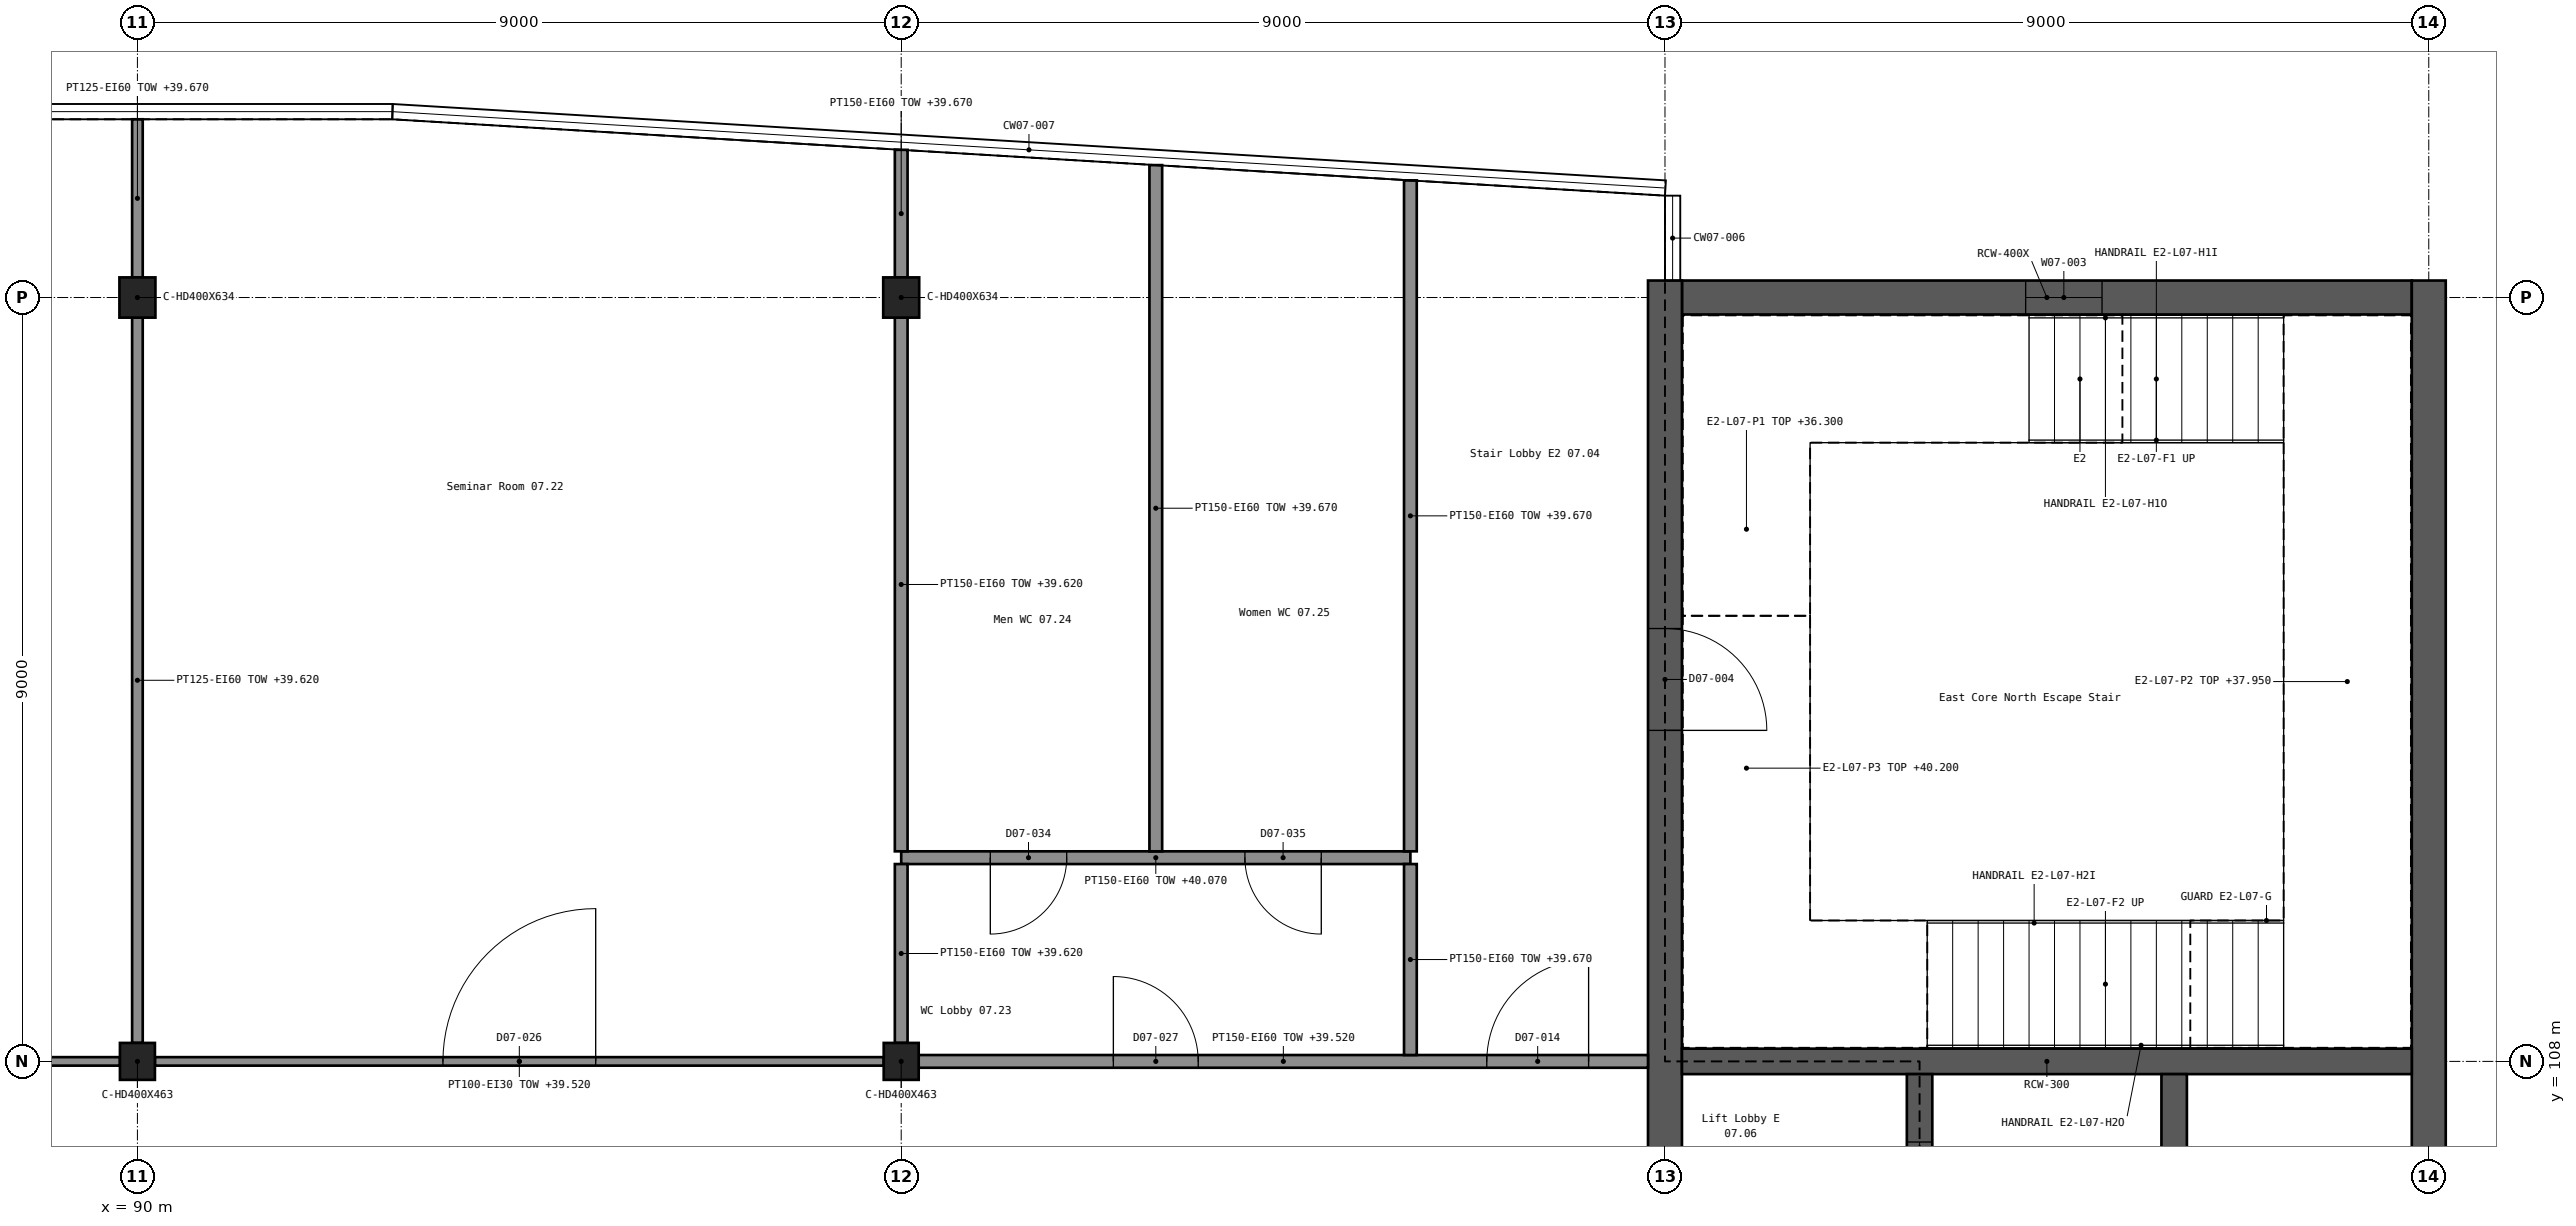
"""IFC4 building model, lengths in metres.
Left out: names, types, materials, properties, quantities, classifications, styles, units other than length and angle.
Written with IfcOpenShell. Run it as: python <this file> out.ifc"""

import sys

from ifc_helpers import new_model, si_unit, direction, frame, frame_2d, origin, origin_2d, place, context, subcontext, project, spatial, rectangle, i_section, extrude, element, fill, save


model = new_model("IFC4")
c1 = context("Model", 3, precision=1e-05, world=origin(), true_north=direction((0.0, 1.0)))
c2 = subcontext(c1, "Body", "Model", "MODEL_VIEW")
j1 = project(units=[si_unit("LENGTHUNIT", "METRE"), si_unit("PLANEANGLEUNIT", "RADIAN")], contexts=[c1])
p1 = place(None, origin())
s1 = spatial("IfcSite", under=j1, at=p1, CompositionType="ELEMENT")
p2 = place(p1, origin())
s2 = spatial("IfcBuilding", under=s1, at=p2, CompositionType="ELEMENT")
p3 = place(p2, frame((0.0, 0.0, 36.3)))
s3 = spatial("IfcBuildingStorey", under=s2, at=p3, CompositionType="ELEMENT", Elevation=36.3)
p4 = place(p3, frame((108.2, 117.0, 0.0), z_axis=(0.0, 0.0, 1.0), x_axis=(1.0, 0.0, 0.0)))
e1 = element("IfcWall", 1, at=p4, inside=s3, PredefinedType="SHEAR", context=c2, shape_type="SweptSolid", body=[
    extrude(rectangle(XDim=8.6, YDim=0.4, at=frame_2d((4.3, 0.0))), origin(), (0.0, 0.0, 1.0), 3.9),
])
p5 = place(p4, frame((4.05, 0.0, 1.2)))
e2 = element("IfcOpeningElement", 2, at=p5, cuts=e1, PredefinedType="OPENING", context=c2, shape_type="SweptSolid", body=[
    extrude(rectangle(XDim=0.9, YDim=1.5, at=frame_2d((0.45, 0.75))), frame((0.0, 0.211, 0.0), z_axis=(0.0, -1.0, 0.0), x_axis=(1.0, 0.0, 0.0)), (0.0, 0.0, 1.0), 0.422),
])
p6 = place(p3, frame((108.0, 89.8, 0.0), z_axis=(0.0, 0.0, 1.0), x_axis=(0.0, 1.0, 0.0)))
e3 = element("IfcWall", 3, at=p6, inside=s3, PredefinedType="SHEAR", context=c2, shape_type="SweptSolid", body=[
    extrude(rectangle(XDim=27.4, YDim=0.4, at=frame_2d((13.7, 0.0))), origin(), (0.0, 0.0, 1.0), 3.9),
])
p7 = place(p6, frame((4.1, 0.0, 0.0)))
e4 = element("IfcOpeningElement", 4, at=p7, cuts=e3, PredefinedType="OPENING", context=c2, shape_type="SweptSolid", body=[
    extrude(rectangle(XDim=1.2, YDim=2.1, at=frame_2d((0.6, 1.05))), frame((0.0, 0.211, 0.0), z_axis=(0.0, -1.0, 0.0), x_axis=(1.0, 0.0, 0.0)), (0.0, 0.0, 1.0), 0.422),
])
p8 = place(p6, frame((22.1, 0.0, 0.0)))
e5 = element("IfcOpeningElement", 5, at=p8, cuts=e3, PredefinedType="OPENING", context=c2, shape_type="SweptSolid", body=[
    extrude(rectangle(XDim=1.2, YDim=2.1, at=frame_2d((0.6, 1.05))), frame((0.0, 0.211, 0.0), z_axis=(0.0, -1.0, 0.0), x_axis=(1.0, 0.0, 0.0)), (0.0, 0.0, 1.0), 0.422),
])
p9 = place(p6, frame((12.5, 0.0, 0.0)))
e6 = element("IfcOpeningElement", 6, at=p9, cuts=e3, PredefinedType="OPENING", context=c2, shape_type="SweptSolid", body=[
    extrude(rectangle(XDim=2.0, YDim=2.1, at=frame_2d((1.0, 1.05))), frame((0.0, 0.211, 0.0), z_axis=(0.0, -1.0, 0.0), x_axis=(1.0, 0.0, 0.0)), (0.0, 0.0, 1.0), 0.422),
])
p10 = place(p3, frame((117.0, 89.8, 0.0), z_axis=(0.0, 0.0, 1.0), x_axis=(0.0, 1.0, 0.0)))
e7 = element("IfcWall", 7, at=p10, inside=s3, PredefinedType="SHEAR", context=c2, shape_type="SweptSolid", body=[
    extrude(rectangle(XDim=27.4, YDim=0.4, at=frame_2d((13.7, 0.0))), origin(), (0.0, 0.0, 1.0), 3.9),
])
p11 = place(p3, frame((108.2, 108.0, 0.0), z_axis=(0.0, 0.0, 1.0), x_axis=(1.0, 0.0, 0.0)))
e8 = element("IfcWall", 8, at=p11, inside=s3, PredefinedType="SHEAR", context=c2, shape_type="SweptSolid", body=[
    extrude(rectangle(XDim=8.6, YDim=0.3, at=frame_2d((4.3, 0.0))), origin(), (0.0, 0.0, 1.0), 3.9),
])
p12 = place(p3, frame((111.0, 99.15, 0.0), z_axis=(0.0, 0.0, 1.0), x_axis=(0.0, 1.0, 0.0)))
e9 = element("IfcWall", 9, at=p12, inside=s3, PredefinedType="SHEAR", context=c2, shape_type="SweptSolid", body=[
    extrude(rectangle(XDim=8.7, YDim=0.3, at=frame_2d((4.35, 0.0))), origin(), (0.0, 0.0, 1.0), 3.9),
])
p13 = place(p12, frame((0.8, 0.0, 0.0)))
e10 = element("IfcOpeningElement", 10, at=p13, cuts=e9, PredefinedType="OPENING", context=c2, shape_type="SweptSolid", body=[
    extrude(rectangle(XDim=1.1, YDim=2.1, at=frame_2d((0.55, 1.05))), frame((0.0, 0.161, 0.0), z_axis=(0.0, -1.0, 0.0), x_axis=(1.0, 0.0, 0.0)), (0.0, 0.0, 1.0), 0.322),
])
p14 = place(p12, frame((3.8, 0.0, 0.0)))
e11 = element("IfcOpeningElement", 11, at=p14, cuts=e9, PredefinedType="OPENING", context=c2, shape_type="SweptSolid", body=[
    extrude(rectangle(XDim=1.1, YDim=2.1, at=frame_2d((0.55, 1.05))), frame((0.0, 0.161, 0.0), z_axis=(0.0, -1.0, 0.0), x_axis=(1.0, 0.0, 0.0)), (0.0, 0.0, 1.0), 0.322),
])
p15 = place(p12, frame((6.8, 0.0, 0.0)))
e12 = element("IfcOpeningElement", 12, at=p15, cuts=e9, PredefinedType="OPENING", context=c2, shape_type="SweptSolid", body=[
    extrude(rectangle(XDim=1.1, YDim=2.1, at=frame_2d((0.55, 1.05))), frame((0.0, 0.161, 0.0), z_axis=(0.0, -1.0, 0.0), x_axis=(1.0, 0.0, 0.0)), (0.0, 0.0, 1.0), 0.322),
])
p16 = place(p3, frame((114.0, 99.15, 0.0), z_axis=(0.0, 0.0, 1.0), x_axis=(0.0, 1.0, 0.0)))
e13 = element("IfcWall", 13, at=p16, inside=s3, PredefinedType="SHEAR", context=c2, shape_type="SweptSolid", body=[
    extrude(rectangle(XDim=8.7, YDim=0.3, at=frame_2d((4.35, 0.0))), origin(), (0.0, 0.0, 1.0), 3.9),
])
for number, where, z_axis, x_axis in (
    (14, (90.0, 108.0, 0.0), (0.0, 0.0, 1.0), (1.0, 0.0, 0.0)),
    (15, (99.0, 108.0, 0.0), (0.0, 0.0, 1.0), (1.0, 0.0, 0.0)),
):
    element("IfcColumn", number, at=place(p3, frame(where, z_axis=z_axis, x_axis=x_axis)), inside=s3, PredefinedType="COLUMN", context=c2, shape_type="SweptSolid", body=[
        extrude(i_section(OverallWidth=0.412, OverallDepth=0.435, WebThickness=0.036, FlangeThickness=0.057, FilletRadius=0.015, at=origin_2d()), origin(), (0.0, 0.0, 1.0), 3.9),
    ])
for number, where, z_axis, x_axis in (
    (16, (90.0, 117.0, 0.0), (0.0, 0.0, 1.0), (1.0, 0.0, 0.0)),
    (17, (99.0, 117.0, 0.0), (0.0, 0.0, 1.0), (1.0, 0.0, 0.0)),
):
    element("IfcColumn", number, at=place(p3, frame(where, z_axis=z_axis, x_axis=x_axis)), inside=s3, PredefinedType="COLUMN", context=c2, shape_type="SweptSolid", body=[
        extrude(i_section(OverallWidth=0.424, OverallDepth=0.474, WebThickness=0.048, FlangeThickness=0.077, FilletRadius=0.015, at=origin_2d()), origin(), (0.0, 0.0, 1.0), 3.9),
    ])
p17 = place(p3, frame((81.206, 108.0, 0.0), z_axis=(0.0, 0.0, 1.0), x_axis=(1.0, 0.0, 0.0)))
e18 = element("IfcWall", 18, at=p17, inside=s3, PredefinedType="PARTITIONING", context=c2, shape_type="SweptSolid", body=[
    extrude(rectangle(XDim=8.588, YDim=0.1, at=frame_2d((4.294, 0.0))), origin(), (0.0, 0.0, 1.0), 3.22),
])
p18 = place(p17, frame((0.544, 0.0, 0.0)))
e19 = element("IfcOpeningElement", 19, at=p18, cuts=e18, PredefinedType="OPENING", context=c2, shape_type="SweptSolid", body=[
    extrude(rectangle(XDim=1.0, YDim=2.1, at=frame_2d((0.5, 1.05))), frame((0.0, 0.061, 0.0), z_axis=(0.0, -1.0, 0.0), x_axis=(1.0, 0.0, 0.0)), (0.0, 0.0, 1.0), 0.122),
])
p19 = place(p17, frame((6.169, 0.0, 0.0)))
e20 = element("IfcOpeningElement", 20, at=p19, cuts=e18, PredefinedType="OPENING", context=c2, shape_type="SweptSolid", body=[
    extrude(rectangle(XDim=1.0, YDim=2.1, at=frame_2d((0.5, 1.05))), frame((0.0, 0.061, 0.0), z_axis=(0.0, -1.0, 0.0), x_axis=(1.0, 0.0, 0.0)), (0.0, 0.0, 1.0), 0.122),
])
p20 = place(p3, frame((90.206, 108.0, 0.0), z_axis=(0.0, 0.0, 1.0), x_axis=(1.0, 0.0, 0.0)))
e21 = element("IfcWall", 21, at=p20, inside=s3, PredefinedType="PARTITIONING", context=c2, shape_type="SweptSolid", body=[
    extrude(rectangle(XDim=8.588, YDim=0.1, at=frame_2d((4.294, 0.0))), origin(), (0.0, 0.0, 1.0), 3.22),
])
p21 = place(p20, frame((3.394, 0.0, 0.0)))
e22 = element("IfcOpeningElement", 22, at=p21, cuts=e21, PredefinedType="OPENING", context=c2, shape_type="SweptSolid", body=[
    extrude(rectangle(XDim=1.8, YDim=2.1, at=frame_2d((0.9, 1.05))), frame((0.0, 0.061, 0.0), z_axis=(0.0, -1.0, 0.0), x_axis=(1.0, 0.0, 0.0)), (0.0, 0.0, 1.0), 0.122),
])
p22 = place(p3, frame((99.206, 108.0, 0.0), z_axis=(0.0, 0.0, 1.0), x_axis=(1.0, 0.0, 0.0)))
e23 = element("IfcWall", 23, at=p22, inside=s3, PredefinedType="PARTITIONING", context=c2, shape_type="SweptSolid", body=[
    extrude(rectangle(XDim=8.594, YDim=0.15, at=frame_2d((4.297, 0.0))), origin(), (0.0, 0.0, 1.0), 3.22),
])
p23 = place(p22, frame((6.694, 0.0, 0.0)))
e24 = element("IfcOpeningElement", 24, at=p23, cuts=e23, PredefinedType="OPENING", context=c2, shape_type="SweptSolid", body=[
    extrude(rectangle(XDim=1.2, YDim=2.1, at=frame_2d((0.6, 1.05))), frame((0.0, 0.086, 0.0), z_axis=(0.0, -1.0, 0.0), x_axis=(1.0, 0.0, 0.0)), (0.0, 0.0, 1.0), 0.172),
])
p24 = place(p22, frame((2.294, 0.0, 0.0)))
e25 = element("IfcOpeningElement", 25, at=p24, cuts=e23, PredefinedType="OPENING", context=c2, shape_type="SweptSolid", body=[
    extrude(rectangle(XDim=1.0, YDim=2.1, at=frame_2d((0.5, 1.05))), frame((0.0, 0.086, 0.0), z_axis=(0.0, -1.0, 0.0), x_axis=(1.0, 0.0, 0.0)), (0.0, 0.0, 1.0), 0.172),
])
p25 = place(p3, frame((99.0, 110.4, 0.0), z_axis=(0.0, 0.0, 1.0), x_axis=(1.0, 0.0, 0.0)))
e26 = element("IfcWall", 26, at=p25, inside=s3, PredefinedType="PARTITIONING", context=c2, shape_type="SweptSolid", body=[
    extrude(rectangle(XDim=6.0, YDim=0.15, at=frame_2d((3.0, 0.0))), origin(), (0.0, 0.0, 1.0), 3.77),
])
p26 = place(p25, frame((1.05, 0.0, 0.0)))
e27 = element("IfcOpeningElement", 27, at=p26, cuts=e26, PredefinedType="OPENING", context=c2, shape_type="SweptSolid", body=[
    extrude(rectangle(XDim=0.9, YDim=2.1, at=frame_2d((0.45, 1.05))), frame((0.0, 0.086, 0.0), z_axis=(0.0, -1.0, 0.0), x_axis=(1.0, 0.0, 0.0)), (0.0, 0.0, 1.0), 0.172),
])
p27 = place(p25, frame((4.05, 0.0, 0.0)))
e28 = element("IfcOpeningElement", 28, at=p27, cuts=e26, PredefinedType="OPENING", context=c2, shape_type="SweptSolid", body=[
    extrude(rectangle(XDim=0.9, YDim=2.1, at=frame_2d((0.45, 1.05))), frame((0.0, 0.086, 0.0), z_axis=(0.0, -1.0, 0.0), x_axis=(1.0, 0.0, 0.0)), (0.0, 0.0, 1.0), 0.172),
])
p28 = place(p3, frame((90.0, 108.218, 0.0), z_axis=(0.0, 0.0, 1.0), x_axis=(0.0, 1.0, 0.0)))
e29 = element("IfcWall", 29, at=p28, inside=s3, PredefinedType="PARTITIONING", context=c2, shape_type="SweptSolid", body=[
    extrude(rectangle(XDim=8.545, YDim=0.125, at=frame_2d((4.273, 0.0))), origin(), (0.0, 0.0, 1.0), 3.32),
])
p29 = place(p3, frame((90.0, 117.237, 0.0), z_axis=(0.0, 0.0, 1.0), x_axis=(0.0, 1.0, 0.0)))
e30 = element("IfcWall", 30, at=p29, inside=s3, PredefinedType="PARTITIONING", context=c2, shape_type="SweptSolid", body=[
    extrude(rectangle(XDim=1.863, YDim=0.125, at=frame_2d((0.932, 0.0))), origin(), (0.0, 0.0, 1.0), 3.37),
])
p30 = place(p3, frame((99.0, 108.218, 0.0), z_axis=(0.0, 0.0, 1.0), x_axis=(0.0, 1.0, 0.0)))
e31 = element("IfcWall", 31, at=p30, inside=s3, PredefinedType="PARTITIONING", context=c2, shape_type="SweptSolid", body=[
    extrude(rectangle(XDim=2.107, YDim=0.15, at=frame_2d((1.054, 0.0))), origin(), (0.0, 0.0, 1.0), 3.32),
])
p31 = place(p3, frame((99.0, 110.475, 0.0), z_axis=(0.0, 0.0, 1.0), x_axis=(0.0, 1.0, 0.0)))
e32 = element("IfcWall", 32, at=p31, inside=s3, PredefinedType="PARTITIONING", context=c2, shape_type="SweptSolid", body=[
    extrude(rectangle(XDim=6.288, YDim=0.15, at=frame_2d((3.144, 0.0))), origin(), (0.0, 0.0, 1.0), 3.32),
])
p32 = place(p3, frame((99.0, 117.237, 0.0), z_axis=(0.0, 0.0, 1.0), x_axis=(0.0, 1.0, 0.0)))
e33 = element("IfcWall", 33, at=p32, inside=s3, PredefinedType="PARTITIONING", context=c2, shape_type="SweptSolid", body=[
    extrude(rectangle(XDim=1.503, YDim=0.15, at=frame_2d((0.751, 0.0))), origin(), (0.0, 0.0, 1.0), 3.37),
])
p33 = place(p3, frame((102.0, 110.475, 0.0), z_axis=(0.0, 0.0, 1.0), x_axis=(0.0, 1.0, 0.0)))
e34 = element("IfcWall", 34, at=p33, inside=s3, PredefinedType="PARTITIONING", context=c2, shape_type="SweptSolid", body=[
    extrude(rectangle(XDim=8.085, YDim=0.15, at=frame_2d((4.042, 0.0))), origin(), (0.0, 0.0, 1.0), 3.37),
])
p34 = place(p3, frame((105.0, 108.075, 0.0), z_axis=(0.0, 0.0, 1.0), x_axis=(0.0, 1.0, 0.0)))
e35 = element("IfcWall", 35, at=p34, inside=s3, PredefinedType="PARTITIONING", context=c2, shape_type="SweptSolid", body=[
    extrude(rectangle(XDim=2.25, YDim=0.15, at=frame_2d((1.125, 0.0))), origin(), (0.0, 0.0, 1.0), 3.37),
])
p35 = place(p3, frame((105.0, 110.475, 0.0), z_axis=(0.0, 0.0, 1.0), x_axis=(0.0, 1.0, 0.0)))
e36 = element("IfcWall", 36, at=p35, inside=s3, PredefinedType="PARTITIONING", context=c2, shape_type="SweptSolid", body=[
    extrude(rectangle(XDim=7.905, YDim=0.15, at=frame_2d((3.952, 0.0))), origin(), (0.0, 0.0, 1.0), 3.37),
])
p36 = place(p5, origin())
e37 = element("IfcWindow", 37, at=p36, inside=s3, PartitioningType="SINGLE_PANEL", PredefinedType="WINDOW", context=c2, shape_type="SweptSolid", body=[
    extrude(rectangle(XDim=0.9, YDim=1.5, at=frame_2d((0.45, 0.75))), frame((0.0, 0.03, 0.0), z_axis=(0.0, -1.0, 0.0), x_axis=(1.0, 0.0, 0.0)), (0.0, 0.0, 1.0), 0.06),
])
fill(e2, e37)
p37 = place(p8, frame((1.2, 0.0, 0.0), z_axis=(0.0, 0.0, 1.0), x_axis=(-1.0, 0.0, 0.0)))
e38 = element("IfcDoor", 38, at=p37, inside=s3, OperationType="SINGLE_SWING_RIGHT", PredefinedType="DOOR", context=c2, shape_type="SweptSolid", body=[
    extrude(rectangle(XDim=1.2, YDim=2.1, at=frame_2d((0.6, 1.05))), frame((0.0, 0.025, 0.0), z_axis=(0.0, -1.0, 0.0), x_axis=(1.0, 0.0, 0.0)), (0.0, 0.0, 1.0), 0.05),
])
fill(e5, e38)
p38 = place(p15, origin())
e39 = element("IfcDoor", 39, at=p38, inside=s3, OperationType="DOUBLE_DOOR_SLIDING", PredefinedType="DOOR", context=c2, shape_type="SweptSolid", body=[
    extrude(rectangle(XDim=1.1, YDim=2.1, at=frame_2d((0.55, 1.05))), frame((0.0, 0.025, 0.0), z_axis=(0.0, -1.0, 0.0), x_axis=(1.0, 0.0, 0.0)), (0.0, 0.0, 1.0), 0.05),
])
fill(e12, e39)
p39 = place(p23, origin())
e40 = element("IfcDoor", 40, at=p39, inside=s3, OperationType="SINGLE_SWING_RIGHT", PredefinedType="DOOR", context=c2, shape_type="SweptSolid", body=[
    extrude(rectangle(XDim=1.2, YDim=2.1, at=frame_2d((0.6, 1.05))), frame((0.0, 0.025, 0.0), z_axis=(0.0, -1.0, 0.0), x_axis=(1.0, 0.0, 0.0)), (0.0, 0.0, 1.0), 0.05),
])
fill(e24, e40)
p40 = place(p21, origin())
e41 = element("IfcDoor", 41, at=p40, inside=s3, OperationType="DOUBLE_DOOR_SINGLE_SWING", PredefinedType="DOOR", context=c2, shape_type="SweptSolid", body=[
    extrude(rectangle(XDim=1.8, YDim=2.1, at=frame_2d((0.9, 1.05))), frame((0.0, 0.025, 0.0), z_axis=(0.0, -1.0, 0.0), x_axis=(1.0, 0.0, 0.0)), (0.0, 0.0, 1.0), 0.05),
])
fill(e22, e41)
p41 = place(p24, origin())
e42 = element("IfcDoor", 42, at=p41, inside=s3, OperationType="SINGLE_SWING_LEFT", PredefinedType="DOOR", context=c2, shape_type="SweptSolid", body=[
    extrude(rectangle(XDim=1.0, YDim=2.1, at=frame_2d((0.5, 1.05))), frame((0.0, 0.025, 0.0), z_axis=(0.0, -1.0, 0.0), x_axis=(1.0, 0.0, 0.0)), (0.0, 0.0, 1.0), 0.05),
])
fill(e25, e42)
p42 = place(p26, frame((0.9, 0.0, 0.0), z_axis=(0.0, 0.0, 1.0), x_axis=(-1.0, 0.0, 0.0)))
e43 = element("IfcDoor", 43, at=p42, inside=s3, OperationType="SINGLE_SWING_RIGHT", PredefinedType="DOOR", context=c2, shape_type="SweptSolid", body=[
    extrude(rectangle(XDim=0.9, YDim=2.1, at=frame_2d((0.45, 1.05))), frame((0.0, 0.025, 0.0), z_axis=(0.0, -1.0, 0.0), x_axis=(1.0, 0.0, 0.0)), (0.0, 0.0, 1.0), 0.05),
])
fill(e27, e43)
p43 = place(p27, frame((0.9, 0.0, 0.0), z_axis=(0.0, 0.0, 1.0), x_axis=(-1.0, 0.0, 0.0)))
e44 = element("IfcDoor", 44, at=p43, inside=s3, OperationType="SINGLE_SWING_LEFT", PredefinedType="DOOR", context=c2, shape_type="SweptSolid", body=[
    extrude(rectangle(XDim=0.9, YDim=2.1, at=frame_2d((0.45, 1.05))), frame((0.0, 0.025, 0.0), z_axis=(0.0, -1.0, 0.0), x_axis=(1.0, 0.0, 0.0)), (0.0, 0.0, 1.0), 0.05),
])
fill(e28, e44)
save(model, sys.argv[1])
